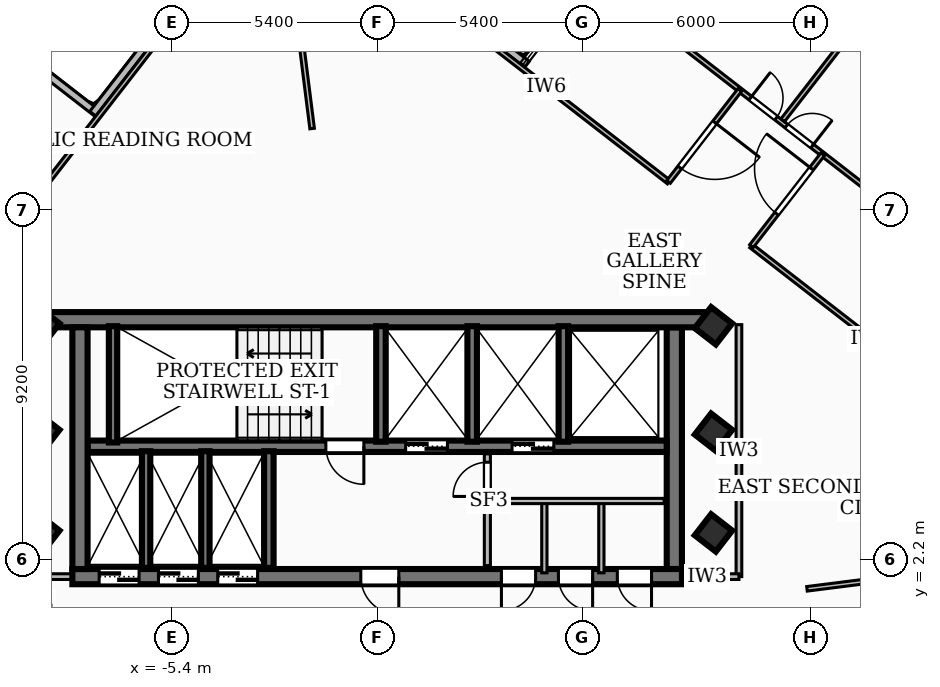
"""IFC4 building model, lengths in metres.
Left out: names, types, materials, properties, quantities, classifications, styles, units other than length and angle.
Written with IfcOpenShell. Run it as: python <this file> out.ifc"""

import sys

from ifc_helpers import new_model, si_unit, direction, frame, frame_2d, origin, origin_2d, place, context, subcontext, project, spatial, rectangle, extrude, element, fill, save


model = new_model("IFC4")
c1 = context("Model", 3, precision=1e-05, world=origin(), true_north=direction((0.0, 1.0)))
c2 = subcontext(c1, "Body", "Model", "MODEL_VIEW")
j1 = project(units=[si_unit("LENGTHUNIT", "METRE"), si_unit("PLANEANGLEUNIT", "RADIAN")], contexts=[c1])
p1 = place(None, origin())
s1 = spatial("IfcSite", under=j1, at=p1, CompositionType="ELEMENT")
p2 = place(p1, origin())
s2 = spatial("IfcBuilding", under=s1, at=p2, CompositionType="ELEMENT")
p3 = place(p2, frame((0.0, 0.0, 261.18)))
s3 = spatial("IfcBuildingStorey", under=s2, at=p3, CompositionType="ELEMENT", Elevation=261.18)
p4 = place(p3, frame((-8.78, 8.51, 0.0), z_axis=(0.0, 0.0, 1.0), x_axis=(1.0, 0.0, 0.0)))
e1 = element("IfcWall", 1, at=p4, inside=s3, PredefinedType="SHEAR", context=c2, shape_type="SweptSolid", body=[
    extrude(rectangle(XDim=17.56, YDim=0.4, at=frame_2d((8.78, 0.0))), origin(), (0.0, 0.0, 1.0), 3.16),
])
p5 = place(p3, frame((8.02, 1.75, 0.0), z_axis=(0.0, 0.0, 1.0), x_axis=(-1.0, 0.0, 0.0)))
e2 = element("IfcWall", 2, at=p5, inside=s3, PredefinedType="SHEAR", context=c2, shape_type="SweptSolid", body=[
    extrude(rectangle(XDim=16.04, YDim=0.4, at=frame_2d((8.02, 0.0))), origin(), (0.0, 0.0, 1.0), 3.16),
])
p6 = place(p5, frame((7.45, 0.0, 0.0)))
e3 = element("IfcOpeningElement", 3, at=p6, cuts=e2, PredefinedType="OPENING", context=c2, shape_type="SweptSolid", body=[
    extrude(rectangle(XDim=1.0, YDim=2.1, at=frame_2d((0.5, 1.05))), frame((0.0, 0.21, 0.0), z_axis=(0.0, -1.0, 0.0), x_axis=(1.0, 0.0, 0.0)), (0.0, 0.0, 1.0), 0.42),
])
p7 = place(p5, frame((14.285, 0.0, 0.0)))
e4 = element("IfcOpeningElement", 4, at=p7, cuts=e2, PredefinedType="OPENING", context=c2, shape_type="SweptSolid", body=[
    extrude(rectangle(XDim=1.05, YDim=2.15, at=frame_2d((0.525, 1.075))), frame((0.0, 0.21, 0.0), z_axis=(0.0, -1.0, 0.0), x_axis=(1.0, 0.0, 0.0)), (0.0, 0.0, 1.0), 0.42),
])
p8 = place(p5, frame((12.725, 0.0, 0.0)))
e5 = element("IfcOpeningElement", 5, at=p8, cuts=e2, PredefinedType="OPENING", context=c2, shape_type="SweptSolid", body=[
    extrude(rectangle(XDim=1.05, YDim=2.15, at=frame_2d((0.525, 1.075))), frame((0.0, 0.21, 0.0), z_axis=(0.0, -1.0, 0.0), x_axis=(1.0, 0.0, 0.0)), (0.0, 0.0, 1.0), 0.42),
])
p9 = place(p5, frame((11.165, 0.0, 0.0)))
e6 = element("IfcOpeningElement", 6, at=p9, cuts=e2, PredefinedType="OPENING", context=c2, shape_type="SweptSolid", body=[
    extrude(rectangle(XDim=1.05, YDim=2.15, at=frame_2d((0.525, 1.075))), frame((0.0, 0.21, 0.0), z_axis=(0.0, -1.0, 0.0), x_axis=(1.0, 0.0, 0.0)), (0.0, 0.0, 1.0), 0.42),
])
p10 = place(p5, frame((3.85, 0.0, 0.0)))
e7 = element("IfcOpeningElement", 7, at=p10, cuts=e2, PredefinedType="OPENING", context=c2, shape_type="SweptSolid", body=[
    extrude(rectangle(XDim=0.9, YDim=2.06, at=frame_2d((0.45, 1.03))), frame((0.0, 0.21, 0.0), z_axis=(0.0, -1.0, 0.0), x_axis=(1.0, 0.0, 0.0)), (0.0, 0.0, 1.0), 0.42),
])
p11 = place(p5, frame((2.35, 0.0, 0.0)))
e8 = element("IfcOpeningElement", 8, at=p11, cuts=e2, PredefinedType="OPENING", context=c2, shape_type="SweptSolid", body=[
    extrude(rectangle(XDim=0.9, YDim=2.06, at=frame_2d((0.45, 1.03))), frame((0.0, 0.21, 0.0), z_axis=(0.0, -1.0, 0.0), x_axis=(1.0, 0.0, 0.0)), (0.0, 0.0, 1.0), 0.42),
])
p12 = place(p5, frame((0.8, 0.0, 0.0)))
e9 = element("IfcOpeningElement", 9, at=p12, cuts=e2, PredefinedType="OPENING", context=c2, shape_type="SweptSolid", body=[
    extrude(rectangle(XDim=0.9, YDim=2.06, at=frame_2d((0.45, 1.03))), frame((0.0, 0.21, 0.0), z_axis=(0.0, -1.0, 0.0), x_axis=(1.0, 0.0, 0.0)), (0.0, 0.0, 1.0), 0.42),
])
for number, where, z_axis, x_axis in (
    (10, (-7.82, 1.95, 0.0), (0.0, 0.0, 1.0), (0.0, 1.0, 0.0)),
    (11, (7.82, 8.31, 0.0), (0.0, 0.0, 1.0), (0.0, -1.0, 0.0)),
):
    element("IfcWall", number, at=place(p3, frame(where, z_axis=z_axis, x_axis=x_axis)), inside=s3, PredefinedType="SHEAR", context=c2, shape_type="SweptSolid", body=[
        extrude(rectangle(XDim=6.36, YDim=0.4, at=frame_2d((3.18, 0.0))), origin(), (0.0, 0.0, 1.0), 3.16),
    ])
p13 = place(p3, frame((7.62, 5.18, 0.0), z_axis=(0.0, 0.0, 1.0), x_axis=(-1.0, 0.0, 0.0)))
e12 = element("IfcWall", 12, at=p13, inside=s3, PredefinedType="SOLIDWALL", context=c2, shape_type="SweptSolid", body=[
    extrude(rectangle(XDim=15.24, YDim=0.3, at=frame_2d((7.62, 0.0))), origin(), (0.0, 0.0, 1.0), 3.16),
])
p14 = place(p13, frame((5.77, 0.0, 0.0)))
e13 = element("IfcOpeningElement", 13, at=p14, cuts=e12, PredefinedType="OPENING", context=c2, shape_type="SweptSolid", body=[
    extrude(rectangle(XDim=1.1, YDim=2.15, at=frame_2d((0.55, 1.075))), frame((0.0, 0.16, 0.0), z_axis=(0.0, -1.0, 0.0), x_axis=(1.0, 0.0, 0.0)), (0.0, 0.0, 1.0), 0.32),
])
p15 = place(p13, frame((2.97, 0.0, 0.0)))
e14 = element("IfcOpeningElement", 14, at=p15, cuts=e12, PredefinedType="OPENING", context=c2, shape_type="SweptSolid", body=[
    extrude(rectangle(XDim=1.1, YDim=2.15, at=frame_2d((0.55, 1.075))), frame((0.0, 0.16, 0.0), z_axis=(0.0, -1.0, 0.0), x_axis=(1.0, 0.0, 0.0)), (0.0, 0.0, 1.0), 0.32),
])
p16 = place(p13, frame((7.97, 0.0, 0.0)))
e15 = element("IfcOpeningElement", 15, at=p16, cuts=e12, PredefinedType="OPENING", context=c2, shape_type="SweptSolid", body=[
    extrude(rectangle(XDim=1.0, YDim=2.1, at=frame_2d((0.5, 1.05))), frame((0.0, 0.16, 0.0), z_axis=(0.0, -1.0, 0.0), x_axis=(1.0, 0.0, 0.0)), (0.0, 0.0, 1.0), 0.32),
])
p17 = place(p3, frame((-6.95, 5.28, 0.0), z_axis=(0.0, 0.0, 1.0), x_axis=(0.0, 1.0, 0.0)))
e16 = element("IfcWall", 16, at=p17, inside=s3, PredefinedType="SOLIDWALL", context=c2, shape_type="SweptSolid", body=[
    extrude(rectangle(XDim=3.06, YDim=0.22, at=frame_2d((1.53, 0.0))), origin(), (0.0, 0.0, 1.0), 3.16),
])
for number, where, z_axis, x_axis in (
    (17, (0.1, 5.3, 0.0), (0.0, 0.0, 1.0), (0.0, 1.0, 0.0)),
    (18, (2.5, 5.3, 0.0), (0.0, 0.0, 1.0), (0.0, 1.0, 0.0)),
    (19, (4.9, 5.3, 0.0), (0.0, 0.0, 1.0), (0.0, 1.0, 0.0)),
):
    element("IfcWall", number, at=place(p3, frame(where, z_axis=z_axis, x_axis=x_axis)), inside=s3, PredefinedType="SOLIDWALL", context=c2, shape_type="SweptSolid", body=[
        extrude(rectangle(XDim=3.04, YDim=0.25, at=frame_2d((1.52, 0.0))), origin(), (0.0, 0.0, 1.0), 3.16),
    ])
p18 = place(p3, frame((-2.85, 1.98, 0.0), z_axis=(0.0, 0.0, 1.0), x_axis=(0.0, 1.0, 0.0)))
e20 = element("IfcWall", 20, at=p18, inside=s3, PredefinedType="SOLIDWALL", context=c2, shape_type="SweptSolid", body=[
    extrude(rectangle(XDim=3.07, YDim=0.25, at=frame_2d((1.535, 0.0))), origin(), (0.0, 0.0, 1.0), 3.16),
])
for number, where, z_axis, x_axis in (
    (21, (-6.08, 1.98, 0.0), (0.0, 0.0, 1.0), (0.0, 1.0, 0.0)),
    (22, (-4.52, 1.98, 0.0), (0.0, 0.0, 1.0), (0.0, 1.0, 0.0)),
):
    element("IfcWall", number, at=place(p3, frame(where, z_axis=z_axis, x_axis=x_axis)), inside=s3, PredefinedType="SOLIDWALL", context=c2, shape_type="SweptSolid", body=[
        extrude(rectangle(XDim=3.07, YDim=0.22, at=frame_2d((1.535, 0.0))), origin(), (0.0, 0.0, 1.0), 3.16),
    ])
for number, where, z_axis, x_axis in (
    (23, (-8.85, 2.9, 0.0), (0.0, 0.0, 1.0), (0.613, 0.79, 0.0)),
    (24, (-8.85, 5.55, 0.0), (0.0, 0.0, 1.0), (0.613, 0.79, 0.0)),
    (25, (8.85, 2.9, 0.0), (0.0, 0.0, 1.0), (0.613, 0.79, 0.0)),
    (26, (8.85, 5.55, 0.0), (0.0, 0.0, 1.0), (0.613, 0.79, 0.0)),
    (27, (-8.85, 8.35, 0.0), (0.0, 0.0, 1.0), (0.613, 0.79, 0.0)),
    (28, (8.85, 8.35, 0.0), (0.0, 0.0, 1.0), (0.613, 0.79, 0.0)),
):
    element("IfcColumn", number, at=place(p3, frame(where, z_axis=z_axis, x_axis=x_axis)), inside=s3, PredefinedType="COLUMN", context=c2, shape_type="SweptSolid", body=[
        extrude(rectangle(XDim=0.7, YDim=0.7, at=origin_2d()), origin(), (0.0, 0.0, 1.0), 3.42),
    ])
p19 = place(p3, frame((-10.248, 16.175, 0.0), z_axis=(0.0, 0.0, 1.0), x_axis=(0.790239683444, -0.612797880797, 0.0)))
e29 = element("IfcWall", 29, at=p19, inside=s3, PredefinedType="SOLIDWALL", context=c2, shape_type="SweptSolid", body=[
    extrude(rectangle(XDim=3.641, YDim=0.2, at=frame_2d((1.82, 0.0))), origin(), (0.0, 0.0, 1.0), 3.16),
])
p20 = place(p3, frame((-7.483, 13.93, 0.0), z_axis=(0.0, 0.0, 1.0), x_axis=(0.612826373036, 0.790217588081, 0.0)))
e30 = element("IfcWall", 30, at=p20, inside=s3, PredefinedType="SOLIDWALL", context=c2, shape_type="SweptSolid", body=[
    extrude(rectangle(XDim=6.542, YDim=0.2, at=frame_2d((3.271, 0.0))), origin(), (0.0, 0.0, 1.0), 3.16),
])
p21 = place(p3, frame((-1.386, 19.362, 0.0), z_axis=(0.0, 0.0, 1.0), x_axis=(0.790076990755, -0.613007625303, 0.0)))
e31 = element("IfcWall", 31, at=p21, inside=s3, PredefinedType="SOLIDWALL", context=c2, shape_type="SweptSolid", body=[
    extrude(rectangle(XDim=6.742, YDim=0.2, at=frame_2d((3.371, 0.0))), origin(), (0.0, 0.0, 1.0), 3.16),
])
p22 = place(p3, frame((2.9, 2.04, 0.0), z_axis=(0.0, 0.0, 1.0), x_axis=(0.0, 1.0, 0.0)))
e32 = element("IfcWall", 32, at=p22, inside=s3, PredefinedType="PARTITIONING", context=c2, shape_type="SweptSolid", body=[
    extrude(rectangle(XDim=2.94, YDim=0.16, at=frame_2d((1.47, 0.0))), origin(), (0.0, 0.0, 1.0), 2.39),
])
p23 = place(p22, frame((1.82, 0.0, 0.0)))
e33 = element("IfcOpeningElement", 33, at=p23, cuts=e32, PredefinedType="OPENING", context=c2, shape_type="SweptSolid", body=[
    extrude(rectangle(XDim=0.9, YDim=2.06, at=frame_2d((0.45, 1.03))), frame((0.0, 0.09, 0.0), z_axis=(0.0, -1.0, 0.0), x_axis=(1.0, 0.0, 0.0)), (0.0, 0.0, 1.0), 0.18),
])
p24 = place(p3, frame((2.9, 3.74, 0.0), z_axis=(0.0, 0.0, 1.0), x_axis=(1.0, 0.0, 0.0)))
e34 = element("IfcWall", 34, at=p24, inside=s3, PredefinedType="PARTITIONING", context=c2, shape_type="SweptSolid", body=[
    extrude(rectangle(XDim=4.65, YDim=0.138, at=frame_2d((2.325, 0.0))), origin(), (0.0, 0.0, 1.0), 3.16),
])
for number, where, z_axis, x_axis in (
    (35, (4.4, 1.85, 0.0), (0.0, 0.0, 1.0), (0.0, 1.0, 0.0)),
    (36, (5.9, 1.85, 0.0), (0.0, 0.0, 1.0), (0.0, 1.0, 0.0)),
):
    element("IfcWall", number, at=place(p3, frame(where, z_axis=z_axis, x_axis=x_axis)), inside=s3, PredefinedType="PARTITIONING", context=c2, shape_type="SweptSolid", body=[
        extrude(rectangle(XDim=1.89, YDim=0.138, at=frame_2d((0.945, 0.0))), origin(), (0.0, 0.0, 1.0), 2.39),
    ])
p25 = place(p3, frame((-7.85, 1.75, 0.0), z_axis=(0.0, 0.0, 1.0), x_axis=(-1.0, 0.0, 0.0)))
e37 = element("IfcWall", 37, at=p25, inside=s3, PredefinedType="PARTITIONING", context=c2, shape_type="SweptSolid", body=[
    extrude(rectangle(XDim=1.67, YDim=0.15, at=frame_2d((0.835, 0.0))), origin(), (0.0, 0.0, 1.0), 2.39),
])
p26 = place(p3, frame((9.52, 1.75, 0.0), z_axis=(0.0, 0.0, 1.0), x_axis=(0.0, 1.0, 0.0)))
e38 = element("IfcWall", 38, at=p26, inside=s3, PredefinedType="PARTITIONING", context=c2, shape_type="SweptSolid", body=[
    extrude(rectangle(XDim=6.63, YDim=0.15, at=frame_2d((3.315, 0.0))), origin(), (0.0, 0.0, 1.0), 3.16),
])
p27 = place(p3, frame((7.85, 1.75, 0.0), z_axis=(0.0, 0.0, 1.0), x_axis=(1.0, 0.0, 0.0)))
e39 = element("IfcWall", 39, at=p27, inside=s3, PredefinedType="PARTITIONING", context=c2, shape_type="SweptSolid", body=[
    extrude(rectangle(XDim=1.67, YDim=0.15, at=frame_2d((0.835, 0.0))), origin(), (0.0, 0.0, 1.0), 2.39),
])
p28 = place(p3, frame((-1.711, 13.54, 0.0), z_axis=(0.0, 0.0, 1.0), x_axis=(-0.125366398214, 0.992110511082, 0.0)))
e40 = element("IfcWall", 40, at=p28, inside=s3, PredefinedType="PARTITIONING", context=c2, shape_type="SweptSolid", body=[
    extrude(rectangle(XDim=6.047, YDim=0.12, at=frame_2d((3.023, 0.0))), origin(), (0.0, 0.0, 1.0), 3.16),
])
p29 = place(p3, frame((11.31, 1.429, 0.0), z_axis=(0.0, 0.0, 1.0), x_axis=(0.992107592132, 0.125389495712, 0.0)))
e41 = element("IfcWall", 41, at=p29, inside=s3, PredefinedType="PARTITIONING", context=c2, shape_type="SweptSolid", body=[
    extrude(rectangle(XDim=8.294, YDim=0.12, at=frame_2d((4.147, 0.0))), origin(), (0.0, 0.0, 1.0), 3.16),
])
p30 = place(p3, frame((7.676, 12.131, 0.0), z_axis=(0.0, 0.0, 1.0), x_axis=(-0.790137186805, 0.61293003355, 0.0)))
e42 = element("IfcWall", 42, at=p30, inside=s3, PredefinedType="PARTITIONING", context=c2, shape_type="SweptSolid", body=[
    extrude(rectangle(XDim=8.149, YDim=0.12, at=frame_2d((4.075, 0.0))), origin(), (0.0, 0.0, 1.0), 3.16),
])
p31 = place(p3, frame((16.122, 5.578, 0.0), z_axis=(0.0, 0.0, 1.0), x_axis=(-0.7900346363, 0.613062210094, 0.0)))
e43 = element("IfcWall", 43, at=p31, inside=s3, PredefinedType="PARTITIONING", context=c2, shape_type="SweptSolid", body=[
    extrude(rectangle(XDim=7.95, YDim=0.12, at=frame_2d((3.975, 0.0))), origin(), (0.0, 0.0, 1.0), 2.53),
])
p32 = place(p3, frame((9.544, 14.555, 0.0), z_axis=(0.0, 0.0, 1.0), x_axis=(-0.612990234131, -0.79009048397, 0.0)))
e44 = element("IfcWall", 44, at=p32, inside=s3, PredefinedType="PARTITIONING", context=c2, shape_type="SweptSolid", body=[
    extrude(rectangle(XDim=3.06, YDim=0.12, at=frame_2d((1.53, 0.0))), origin(), (0.0, 0.0, 1.0), 2.53),
])
p33 = place(p32, frame((1.08, 0.0, 0.0)))
e45 = element("IfcOpeningElement", 45, at=p33, cuts=e44, PredefinedType="OPENING", context=c2, shape_type="SweptSolid", body=[
    extrude(rectangle(XDim=1.5, YDim=2.12, at=frame_2d((0.75, 1.06))), frame((0.0, 0.07, 0.0), z_axis=(0.0, -1.0, 0.0), x_axis=(1.0, 0.0, 0.0)), (0.0, 0.0, 1.0), 0.14),
])
p34 = place(p3, frame((9.849, 10.446, 0.0), z_axis=(0.0, 0.0, 1.0), x_axis=(0.612945563076, 0.790125139902, 0.0)))
e46 = element("IfcWall", 46, at=p34, inside=s3, PredefinedType="PARTITIONING", context=c2, shape_type="SweptSolid", body=[
    extrude(rectangle(XDim=3.059, YDim=0.12, at=frame_2d((1.53, 0.0))), origin(), (0.0, 0.0, 1.0), 3.16),
])
p35 = place(p34, frame((1.08, 0.0, 0.0)))
e47 = element("IfcOpeningElement", 47, at=p35, cuts=e46, PredefinedType="OPENING", context=c2, shape_type="SweptSolid", body=[
    extrude(rectangle(XDim=1.5, YDim=2.12, at=frame_2d((0.75, 1.06))), frame((0.0, 0.07, 0.0), z_axis=(0.0, -1.0, 0.0), x_axis=(1.0, 0.0, 0.0)), (0.0, 0.0, 1.0), 0.14),
])
p36 = place(p3, frame((10.671, 13.757, 0.0), z_axis=(0.0, 0.0, 1.0), x_axis=(0.61292966537, 0.790137472412, 0.0)))
e48 = element("IfcWall", 48, at=p36, inside=s3, PredefinedType="PARTITIONING", context=c2, shape_type="SweptSolid", body=[
    extrude(rectangle(XDim=6.624, YDim=0.12, at=frame_2d((3.312, 0.0))), origin(), (0.0, 0.0, 1.0), 3.16),
])
p37 = place(p3, frame((5.707, 17.531, 0.0), z_axis=(0.0, 0.0, 1.0), x_axis=(0.790153529347, -0.612908965557, 0.0)))
e49 = element("IfcWall", 49, at=p37, inside=s3, PredefinedType="PARTITIONING", context=c2, shape_type="SweptSolid", body=[
    extrude(rectangle(XDim=12.671, YDim=0.12, at=frame_2d((6.335, 0.0))), origin(), (0.0, 0.0, 1.0), 2.53),
])
p38 = place(p37, frame((6.405, 0.0, 0.0)))
e50 = element("IfcOpeningElement", 50, at=p38, cuts=e49, PredefinedType="OPENING", context=c2, shape_type="SweptSolid", body=[
    extrude(rectangle(XDim=0.86, YDim=2.04, at=frame_2d((0.43, 1.02))), frame((0.0, 0.07, 0.0), z_axis=(0.0, -1.0, 0.0), x_axis=(1.0, 0.0, 0.0)), (0.0, 0.0, 1.0), 0.14),
])
p39 = place(p37, frame((5.205, 0.0, 0.0)))
e51 = element("IfcOpeningElement", 51, at=p39, cuts=e49, PredefinedType="OPENING", context=c2, shape_type="SweptSolid", body=[
    extrude(rectangle(XDim=0.86, YDim=2.04, at=frame_2d((0.43, 1.02))), frame((0.0, 0.07, 0.0), z_axis=(0.0, -1.0, 0.0), x_axis=(1.0, 0.0, 0.0)), (0.0, 0.0, 1.0), 0.14),
])
p40 = place(p3, frame((-17.555, 0.683, 0.0), z_axis=(0.0, 0.0, 1.0), x_axis=(0.61291959311, 0.790145285617, 0.0)))
e52 = element("IfcWall", 52, at=p40, inside=s3, PredefinedType="PARTITIONING", context=c2, shape_type="SweptSolid", body=[
    extrude(rectangle(XDim=20.239, YDim=0.12, at=frame_2d((10.12, 0.0))), origin(), (0.0, 0.0, 1.0), 2.53),
])
p41 = place(p40, frame((9.96, 0.0, 0.0)))
e53 = element("IfcOpeningElement", 53, at=p41, cuts=e52, PredefinedType="OPENING", context=c2, shape_type="SweptSolid", body=[
    extrude(rectangle(XDim=0.86, YDim=2.04, at=frame_2d((0.43, 1.02))), frame((0.0, 0.07, 0.0), z_axis=(0.0, -1.0, 0.0), x_axis=(1.0, 0.0, 0.0)), (0.0, 0.0, 1.0), 0.14),
])
p42 = place(p40, frame((8.52, 0.0, 0.0)))
e54 = element("IfcOpeningElement", 54, at=p42, cuts=e52, PredefinedType="OPENING", context=c2, shape_type="SweptSolid", body=[
    extrude(rectangle(XDim=0.86, YDim=2.04, at=frame_2d((0.43, 1.02))), frame((0.0, 0.07, 0.0), z_axis=(0.0, -1.0, 0.0), x_axis=(1.0, 0.0, 0.0)), (0.0, 0.0, 1.0), 0.14),
])
p43 = place(p6, origin())
e55 = element("IfcDoor", 55, at=p43, inside=s3, OperationType="SINGLE_SWING_LEFT", PredefinedType="DOOR", context=c2, shape_type="SweptSolid", body=[
    extrude(rectangle(XDim=1.0, YDim=2.1, at=frame_2d((0.5, 1.05))), frame((0.0, 0.025, 0.0), z_axis=(0.0, -1.0, 0.0), x_axis=(1.0, 0.0, 0.0)), (0.0, 0.0, 1.0), 0.05),
])
fill(e3, e55)
p44 = place(p14, origin())
e56 = element("IfcDoor", 56, at=p44, inside=s3, OperationType="DOUBLE_DOOR_SLIDING", PredefinedType="DOOR", context=c2, shape_type="SweptSolid", body=[
    extrude(rectangle(XDim=1.1, YDim=2.15, at=frame_2d((0.55, 1.075))), frame((0.0, 0.025, 0.0), z_axis=(0.0, -1.0, 0.0), x_axis=(1.0, 0.0, 0.0)), (0.0, 0.0, 1.0), 0.05),
])
fill(e13, e56)
p45 = place(p15, origin())
e57 = element("IfcDoor", 57, at=p45, inside=s3, OperationType="DOUBLE_DOOR_SLIDING", PredefinedType="DOOR", context=c2, shape_type="SweptSolid", body=[
    extrude(rectangle(XDim=1.1, YDim=2.15, at=frame_2d((0.55, 1.075))), frame((0.0, 0.025, 0.0), z_axis=(0.0, -1.0, 0.0), x_axis=(1.0, 0.0, 0.0)), (0.0, 0.0, 1.0), 0.05),
])
fill(e14, e57)
p46 = place(p16, origin())
e58 = element("IfcDoor", 58, at=p46, inside=s3, OperationType="SINGLE_SWING_LEFT", PredefinedType="DOOR", context=c2, shape_type="SweptSolid", body=[
    extrude(rectangle(XDim=1.0, YDim=2.1, at=frame_2d((0.5, 1.05))), frame((0.0, 0.025, 0.0), z_axis=(0.0, -1.0, 0.0), x_axis=(1.0, 0.0, 0.0)), (0.0, 0.0, 1.0), 0.05),
])
fill(e15, e58)
p47 = place(p7, origin())
e59 = element("IfcDoor", 59, at=p47, inside=s3, OperationType="DOUBLE_DOOR_SLIDING", PredefinedType="DOOR", context=c2, shape_type="SweptSolid", body=[
    extrude(rectangle(XDim=1.05, YDim=2.15, at=frame_2d((0.525, 1.075))), frame((0.0, 0.025, 0.0), z_axis=(0.0, -1.0, 0.0), x_axis=(1.0, 0.0, 0.0)), (0.0, 0.0, 1.0), 0.05),
])
fill(e4, e59)
p48 = place(p8, origin())
e60 = element("IfcDoor", 60, at=p48, inside=s3, OperationType="DOUBLE_DOOR_SLIDING", PredefinedType="DOOR", context=c2, shape_type="SweptSolid", body=[
    extrude(rectangle(XDim=1.05, YDim=2.15, at=frame_2d((0.525, 1.075))), frame((0.0, 0.025, 0.0), z_axis=(0.0, -1.0, 0.0), x_axis=(1.0, 0.0, 0.0)), (0.0, 0.0, 1.0), 0.05),
])
fill(e5, e60)
p49 = place(p9, origin())
e61 = element("IfcDoor", 61, at=p49, inside=s3, OperationType="DOUBLE_DOOR_SLIDING", PredefinedType="DOOR", context=c2, shape_type="SweptSolid", body=[
    extrude(rectangle(XDim=1.05, YDim=2.15, at=frame_2d((0.525, 1.075))), frame((0.0, 0.025, 0.0), z_axis=(0.0, -1.0, 0.0), x_axis=(1.0, 0.0, 0.0)), (0.0, 0.0, 1.0), 0.05),
])
fill(e6, e61)
p50 = place(p10, origin())
e62 = element("IfcDoor", 62, at=p50, inside=s3, OperationType="SINGLE_SWING_RIGHT", PredefinedType="DOOR", context=c2, shape_type="SweptSolid", body=[
    extrude(rectangle(XDim=0.9, YDim=2.06, at=frame_2d((0.45, 1.03))), frame((0.0, 0.025, 0.0), z_axis=(0.0, -1.0, 0.0), x_axis=(1.0, 0.0, 0.0)), (0.0, 0.0, 1.0), 0.05),
])
fill(e7, e62)
p51 = place(p11, origin())
e63 = element("IfcDoor", 63, at=p51, inside=s3, OperationType="SINGLE_SWING_LEFT", PredefinedType="DOOR", context=c2, shape_type="SweptSolid", body=[
    extrude(rectangle(XDim=0.9, YDim=2.06, at=frame_2d((0.45, 1.03))), frame((0.0, 0.025, 0.0), z_axis=(0.0, -1.0, 0.0), x_axis=(1.0, 0.0, 0.0)), (0.0, 0.0, 1.0), 0.05),
])
fill(e8, e63)
p52 = place(p12, origin())
e64 = element("IfcDoor", 64, at=p52, inside=s3, OperationType="SINGLE_SWING_LEFT", PredefinedType="DOOR", context=c2, shape_type="SweptSolid", body=[
    extrude(rectangle(XDim=0.9, YDim=2.06, at=frame_2d((0.45, 1.03))), frame((0.0, 0.025, 0.0), z_axis=(0.0, -1.0, 0.0), x_axis=(1.0, 0.0, 0.0)), (0.0, 0.0, 1.0), 0.05),
])
fill(e9, e64)
p53 = place(p23, origin())
e65 = element("IfcDoor", 65, at=p53, inside=s3, OperationType="SINGLE_SWING_LEFT", PredefinedType="DOOR", context=c2, shape_type="SweptSolid", body=[
    extrude(rectangle(XDim=0.9, YDim=2.06, at=frame_2d((0.45, 1.03))), frame((0.0, 0.025, 0.0), z_axis=(0.0, -1.0, 0.0), x_axis=(1.0, 0.0, 0.0)), (0.0, 0.0, 1.0), 0.05),
])
fill(e33, e65)
p54 = place(p33, origin())
e66 = element("IfcDoor", 66, at=p54, inside=s3, OperationType="SINGLE_SWING_LEFT", PredefinedType="DOOR", context=c2, shape_type="SweptSolid", body=[
    extrude(rectangle(XDim=1.5, YDim=2.12, at=frame_2d((0.75, 1.06))), frame((0.0, 0.025, 0.0), z_axis=(0.0, -1.0, 0.0), x_axis=(1.0, 0.0, 0.0)), (0.0, 0.0, 1.0), 0.05),
])
fill(e45, e66)
p55 = place(p35, origin())
e67 = element("IfcDoor", 67, at=p55, inside=s3, OperationType="SINGLE_SWING_RIGHT", PredefinedType="DOOR", context=c2, shape_type="SweptSolid", body=[
    extrude(rectangle(XDim=1.5, YDim=2.12, at=frame_2d((0.75, 1.06))), frame((0.0, 0.025, 0.0), z_axis=(0.0, -1.0, 0.0), x_axis=(1.0, 0.0, 0.0)), (0.0, 0.0, 1.0), 0.05),
])
fill(e47, e67)
p56 = place(p38, origin())
e68 = element("IfcDoor", 68, at=p56, inside=s3, OperationType="SINGLE_SWING_RIGHT", PredefinedType="DOOR", context=c2, shape_type="SweptSolid", body=[
    extrude(rectangle(XDim=0.86, YDim=2.04, at=frame_2d((0.43, 1.02))), frame((0.0, 0.025, 0.0), z_axis=(0.0, -1.0, 0.0), x_axis=(1.0, 0.0, 0.0)), (0.0, 0.0, 1.0), 0.05),
])
fill(e50, e68)
p57 = place(p39, origin())
e69 = element("IfcDoor", 69, at=p57, inside=s3, OperationType="SINGLE_SWING_LEFT", PredefinedType="DOOR", context=c2, shape_type="SweptSolid", body=[
    extrude(rectangle(XDim=0.86, YDim=2.04, at=frame_2d((0.43, 1.02))), frame((0.0, 0.025, 0.0), z_axis=(0.0, -1.0, 0.0), x_axis=(1.0, 0.0, 0.0)), (0.0, 0.0, 1.0), 0.05),
])
fill(e51, e69)
save(model, sys.argv[1])
